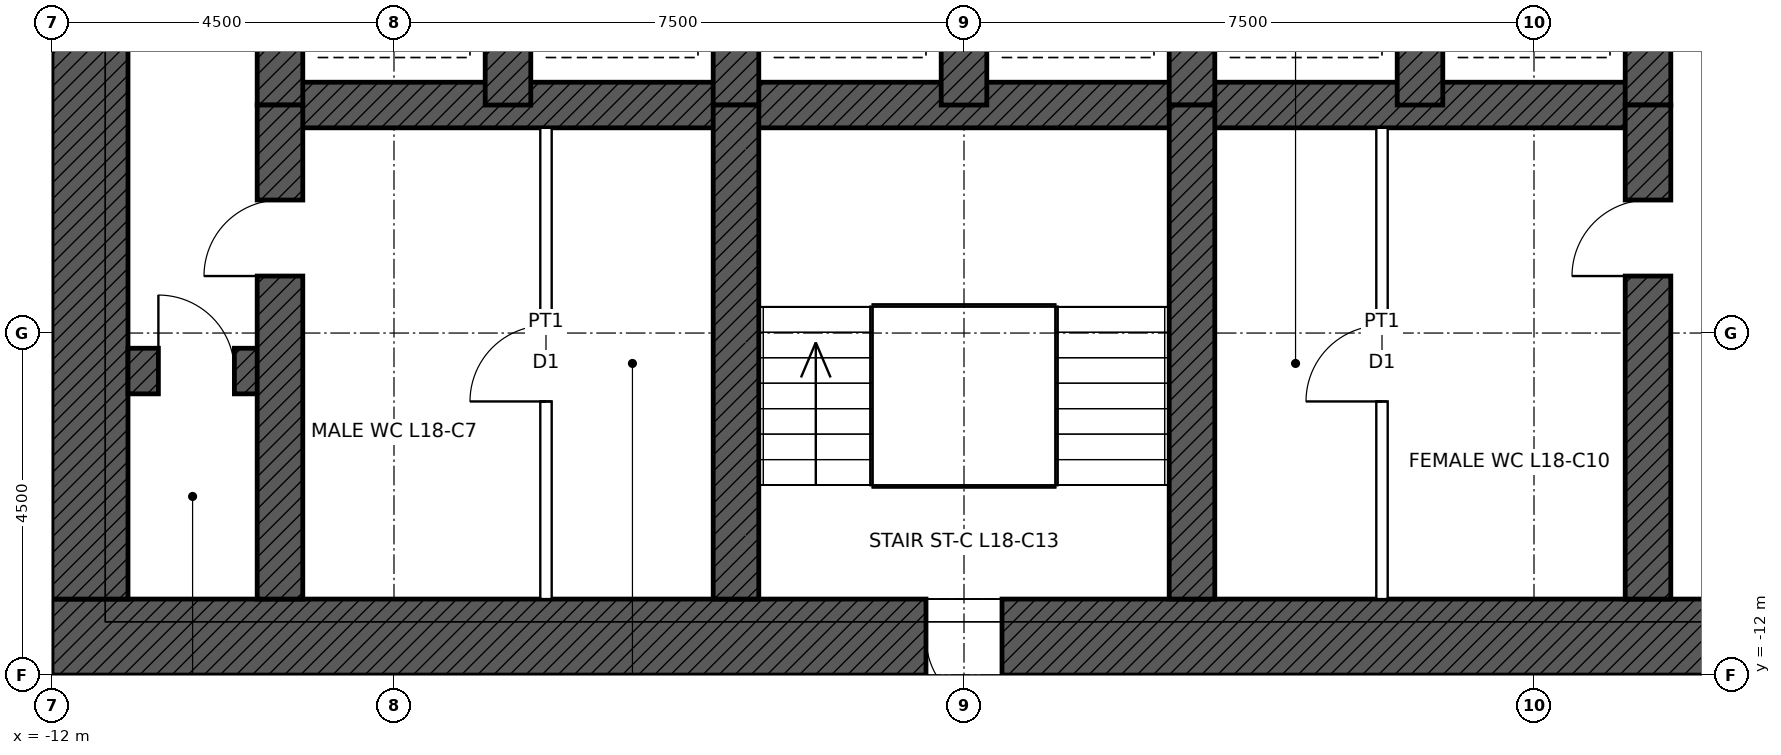
"""IFC4 building model, lengths in metres.
Left out: names, types, materials, properties, quantities, classifications, styles, units other than length and angle.
Written with IfcOpenShell. Run it as: python <this file> out.ifc"""

import sys

from ifc_helpers import new_model, si_unit, direction, frame, frame_2d, origin, place, context, subcontext, project, spatial, rectangle, extrude, element, fill, save


model = new_model("IFC4")
c1 = context("Model", 3, precision=1e-05, world=origin(), true_north=direction((0.0, 1.0)))
c2 = subcontext(c1, "Body", "Model", "MODEL_VIEW")
j1 = project(units=[si_unit("LENGTHUNIT", "METRE"), si_unit("PLANEANGLEUNIT", "RADIAN")], contexts=[c1])
p1 = place(None, origin())
s1 = spatial("IfcSite", under=j1, at=p1, CompositionType="ELEMENT")
p2 = place(p1, origin())
s2 = spatial("IfcBuilding", under=s1, at=p2, CompositionType="ELEMENT")
p3 = place(p2, frame((0.0, 0.0, 93.4)))
s3 = spatial("IfcBuildingStorey", under=s2, at=p3, CompositionType="ELEMENT", Elevation=93.4)
p4 = place(p3, frame((12.0, -11.5, 0.0), z_axis=(0.0, 0.0, 1.0), x_axis=(-1.0, 0.0, 0.0)))
e1 = element("IfcWall", 1, at=p4, inside=s3, PredefinedType="SHEAR", context=c2, shape_type="SweptSolid", body=[
    extrude(rectangle(XDim=24.0, YDim=1.0, at=frame_2d((12.0, 0.0))), origin(), (0.0, 0.0, 1.0), 5.0),
])
p5 = place(p4, frame((11.5, 0.0, 0.0)))
e2 = element("IfcOpeningElement", 2, at=p5, cuts=e1, PredefinedType="OPENING", context=c2, shape_type="SweptSolid", body=[
    extrude(rectangle(XDim=1.0, YDim=2.1, at=frame_2d((0.5, 1.05))), frame((0.0, 0.51, 0.0), z_axis=(0.0, -1.0, 0.0), x_axis=(1.0, 0.0, 0.0)), (0.0, 0.0, 1.0), 1.02),
])
p6 = place(p4, frame((1.0, 0.0, 0.0)))
e3 = element("IfcOpeningElement", 3, at=p6, cuts=e1, PredefinedType="OPENING", context=c2, shape_type="SweptSolid", body=[
    extrude(rectangle(XDim=1.0, YDim=2.4, at=frame_2d((0.5, 1.2))), frame((0.0, 0.51, 0.0), z_axis=(0.0, -1.0, 0.0), x_axis=(1.0, 0.0, 0.0)), (0.0, 0.0, 1.0), 1.02),
])
p7 = place(p3, frame((-11.5, -11.0, 0.0), z_axis=(0.0, 0.0, 1.0), x_axis=(0.0, 1.0, 0.0)))
e4 = element("IfcWall", 4, at=p7, inside=s3, PredefinedType="SHEAR", context=c2, shape_type="SweptSolid", body=[
    extrude(rectangle(XDim=22.0, YDim=1.0, at=frame_2d((11.0, 0.0))), origin(), (0.0, 0.0, 1.0), 5.0),
])
p8 = place(p7, frame((10.5, 0.0, 0.0)))
e5 = element("IfcOpeningElement", 5, at=p8, cuts=e4, PredefinedType="OPENING", context=c2, shape_type="SweptSolid", body=[
    extrude(rectangle(XDim=1.0, YDim=2.4, at=frame_2d((0.5, 1.2))), frame((0.0, 0.51, 0.0), z_axis=(0.0, -1.0, 0.0), x_axis=(1.0, 0.0, 0.0)), (0.0, 0.0, 1.0), 1.02),
])
p9 = place(p3, frame((-9.0, -4.5, 0.0), z_axis=(0.0, 0.0, 1.0), x_axis=(1.0, 0.0, 0.0)))
e6 = element("IfcWall", 6, at=p9, inside=s3, PredefinedType="SHEAR", context=c2, shape_type="SweptSolid", body=[
    extrude(rectangle(XDim=18.0, YDim=0.6, at=frame_2d((9.0, 0.0))), origin(), (0.0, 0.0, 1.0), 5.0),
])
p10 = place(p3, frame((-11.0, -8.0, 0.0), z_axis=(0.0, 0.0, 1.0), x_axis=(1.0, 0.0, 0.0)))
e7 = element("IfcWall", 7, at=p10, inside=s3, PredefinedType="SHEAR", context=c2, shape_type="SweptSolid", body=[
    extrude(rectangle(XDim=2.0, YDim=0.6, at=frame_2d((1.0, 0.0))), origin(), (0.0, 0.0, 1.0), 5.0),
])
p11 = place(p10, frame((0.4, 0.0, 0.0)))
e8 = element("IfcOpeningElement", 8, at=p11, cuts=e7, PredefinedType="OPENING", context=c2, shape_type="SweptSolid", body=[
    extrude(rectangle(XDim=1.0, YDim=2.1, at=frame_2d((0.5, 1.05))), frame((0.0, 0.31, 0.0), z_axis=(0.0, -1.0, 0.0), x_axis=(1.0, 0.0, 0.0)), (0.0, 0.0, 1.0), 0.62),
])
for number, where, z_axis, x_axis in (
    (9, (-9.0, -4.5, 0.0), (0.0, 0.0, 1.0), (0.0, 1.0, 0.0)),
    (10, (9.0, -4.5, 0.0), (0.0, 0.0, 1.0), (0.0, 1.0, 0.0)),
    (11, (-6.0, -4.5, 0.0), (0.0, 0.0, 1.0), (0.0, 1.0, 0.0)),
    (12, (-3.0, -4.5, 0.0), (0.0, 0.0, 1.0), (0.0, 1.0, 0.0)),
    (13, (0.0, -4.5, 0.0), (0.0, 0.0, 1.0), (0.0, 1.0, 0.0)),
    (14, (3.0, -4.5, 0.0), (0.0, 0.0, 1.0), (0.0, 1.0, 0.0)),
    (15, (6.0, -4.5, 0.0), (0.0, 0.0, 1.0), (0.0, 1.0, 0.0)),
):
    element("IfcWall", number, at=place(p3, frame(where, z_axis=z_axis, x_axis=x_axis)), inside=s3, PredefinedType="SHEAR", context=c2, shape_type="SweptSolid", body=[
        extrude(rectangle(XDim=3.0, YDim=0.6, at=frame_2d((1.5, 0.0))), origin(), (0.0, 0.0, 1.0), 5.0),
    ])
p12 = place(p3, frame((-9.0, -11.0, 0.0), z_axis=(0.0, 0.0, 1.0), x_axis=(0.0, 1.0, 0.0)))
e16 = element("IfcWall", 16, at=p12, inside=s3, PredefinedType="SHEAR", context=c2, shape_type="SweptSolid", body=[
    extrude(rectangle(XDim=6.5, YDim=0.6, at=frame_2d((3.25, 0.0))), origin(), (0.0, 0.0, 1.0), 5.0),
])
p13 = place(p12, frame((4.25, 0.0, 0.0)))
e17 = element("IfcOpeningElement", 17, at=p13, cuts=e16, PredefinedType="OPENING", context=c2, shape_type="SweptSolid", body=[
    extrude(rectangle(XDim=1.0, YDim=2.1, at=frame_2d((0.5, 1.05))), frame((0.0, 0.31, 0.0), z_axis=(0.0, -1.0, 0.0), x_axis=(1.0, 0.0, 0.0)), (0.0, 0.0, 1.0), 0.62),
])
p14 = place(p3, frame((9.0, -11.0, 0.0), z_axis=(0.0, 0.0, 1.0), x_axis=(0.0, 1.0, 0.0)))
e18 = element("IfcWall", 18, at=p14, inside=s3, PredefinedType="SHEAR", context=c2, shape_type="SweptSolid", body=[
    extrude(rectangle(XDim=6.5, YDim=0.6, at=frame_2d((3.25, 0.0))), origin(), (0.0, 0.0, 1.0), 5.0),
])
p15 = place(p14, frame((4.25, 0.0, 0.0)))
e19 = element("IfcOpeningElement", 19, at=p15, cuts=e18, PredefinedType="OPENING", context=c2, shape_type="SweptSolid", body=[
    extrude(rectangle(XDim=1.0, YDim=2.1, at=frame_2d((0.5, 1.05))), frame((0.0, 0.31, 0.0), z_axis=(0.0, -1.0, 0.0), x_axis=(1.0, 0.0, 0.0)), (0.0, 0.0, 1.0), 0.62),
])
for number, where, z_axis, x_axis in (
    (20, (-3.0, -11.0, 0.0), (0.0, 0.0, 1.0), (0.0, 1.0, 0.0)),
    (21, (3.0, -11.0, 0.0), (0.0, 0.0, 1.0), (0.0, 1.0, 0.0)),
):
    element("IfcWall", number, at=place(p3, frame(where, z_axis=z_axis, x_axis=x_axis)), inside=s3, PredefinedType="SHEAR", context=c2, shape_type="SweptSolid", body=[
        extrude(rectangle(XDim=6.5, YDim=0.6, at=frame_2d((3.25, 0.0))), origin(), (0.0, 0.0, 1.0), 5.0),
    ])
p16 = place(p3, frame((-5.5, -11.0, 0.0), z_axis=(0.0, 0.0, 1.0), x_axis=(0.0, 1.0, 0.0)))
e22 = element("IfcWall", 22, at=p16, inside=s3, PredefinedType="PARTITIONING", context=c2, shape_type="SweptSolid", body=[
    extrude(rectangle(XDim=6.2, YDim=0.15, at=frame_2d((3.1, 0.0))), origin(), (0.0, 0.0, 1.0), 4.75),
])
p17 = place(p16, frame((2.6, 0.0, 0.0)))
e23 = element("IfcOpeningElement", 23, at=p17, cuts=e22, PredefinedType="OPENING", context=c2, shape_type="SweptSolid", body=[
    extrude(rectangle(XDim=1.0, YDim=2.1, at=frame_2d((0.5, 1.05))), frame((0.0, 0.085, 0.0), z_axis=(0.0, -1.0, 0.0), x_axis=(1.0, 0.0, 0.0)), (0.0, 0.0, 1.0), 0.17),
])
p18 = place(p3, frame((5.5, -11.0, 0.0), z_axis=(0.0, 0.0, 1.0), x_axis=(0.0, 1.0, 0.0)))
e24 = element("IfcWall", 24, at=p18, inside=s3, PredefinedType="PARTITIONING", context=c2, shape_type="SweptSolid", body=[
    extrude(rectangle(XDim=6.2, YDim=0.15, at=frame_2d((3.1, 0.0))), origin(), (0.0, 0.0, 1.0), 4.75),
])
p19 = place(p18, frame((2.6, 0.0, 0.0)))
e25 = element("IfcOpeningElement", 25, at=p19, cuts=e24, PredefinedType="OPENING", context=c2, shape_type="SweptSolid", body=[
    extrude(rectangle(XDim=1.0, YDim=2.1, at=frame_2d((0.5, 1.05))), frame((0.0, 0.085, 0.0), z_axis=(0.0, -1.0, 0.0), x_axis=(1.0, 0.0, 0.0)), (0.0, 0.0, 1.0), 0.17),
])
p20 = place(p5, origin())
e26 = element("IfcDoor", 26, at=p20, inside=s3, OperationType="SINGLE_SWING_LEFT", PredefinedType="DOOR", context=c2, shape_type="SweptSolid", body=[
    extrude(rectangle(XDim=1.0, YDim=2.1, at=frame_2d((0.5, 1.05))), frame((0.0, 0.485, 0.0), z_axis=(0.0, -1.0, 0.0), x_axis=(1.0, 0.0, 0.0)), (0.0, 0.0, 1.0), 0.05),
])
fill(e2, e26)
p21 = place(p13, origin())
e27 = element("IfcDoor", 27, at=p21, inside=s3, OperationType="SINGLE_SWING_LEFT", PredefinedType="DOOR", context=c2, shape_type="SweptSolid", body=[
    extrude(rectangle(XDim=1.0, YDim=2.1, at=frame_2d((0.5, 1.05))), frame((0.0, 0.025, 0.0), z_axis=(0.0, -1.0, 0.0), x_axis=(1.0, 0.0, 0.0)), (0.0, 0.0, 1.0), 0.05),
])
fill(e17, e27)
p22 = place(p15, origin())
e28 = element("IfcDoor", 28, at=p22, inside=s3, OperationType="SINGLE_SWING_LEFT", PredefinedType="DOOR", context=c2, shape_type="SweptSolid", body=[
    extrude(rectangle(XDim=1.0, YDim=2.1, at=frame_2d((0.5, 1.05))), frame((0.0, 0.025, 0.0), z_axis=(0.0, -1.0, 0.0), x_axis=(1.0, 0.0, 0.0)), (0.0, 0.0, 1.0), 0.05),
])
fill(e19, e28)
p23 = place(p11, origin())
e29 = element("IfcDoor", 29, at=p23, inside=s3, OperationType="SINGLE_SWING_LEFT", PredefinedType="DOOR", context=c2, shape_type="SweptSolid", body=[
    extrude(rectangle(XDim=1.0, YDim=2.1, at=frame_2d((0.5, 1.05))), frame((0.0, 0.025, 0.0), z_axis=(0.0, -1.0, 0.0), x_axis=(1.0, 0.0, 0.0)), (0.0, 0.0, 1.0), 0.05),
])
fill(e8, e29)
p24 = place(p17, origin())
e30 = element("IfcDoor", 30, at=p24, inside=s3, OperationType="SINGLE_SWING_LEFT", PredefinedType="DOOR", context=c2, shape_type="SweptSolid", body=[
    extrude(rectangle(XDim=1.0, YDim=2.1, at=frame_2d((0.5, 1.05))), frame((0.0, 0.025, 0.0), z_axis=(0.0, -1.0, 0.0), x_axis=(1.0, 0.0, 0.0)), (0.0, 0.0, 1.0), 0.05),
])
fill(e23, e30)
p25 = place(p19, origin())
e31 = element("IfcDoor", 31, at=p25, inside=s3, OperationType="SINGLE_SWING_LEFT", PredefinedType="DOOR", context=c2, shape_type="SweptSolid", body=[
    extrude(rectangle(XDim=1.0, YDim=2.1, at=frame_2d((0.5, 1.05))), frame((0.0, 0.025, 0.0), z_axis=(0.0, -1.0, 0.0), x_axis=(1.0, 0.0, 0.0)), (0.0, 0.0, 1.0), 0.05),
])
fill(e25, e31)
save(model, sys.argv[1])
